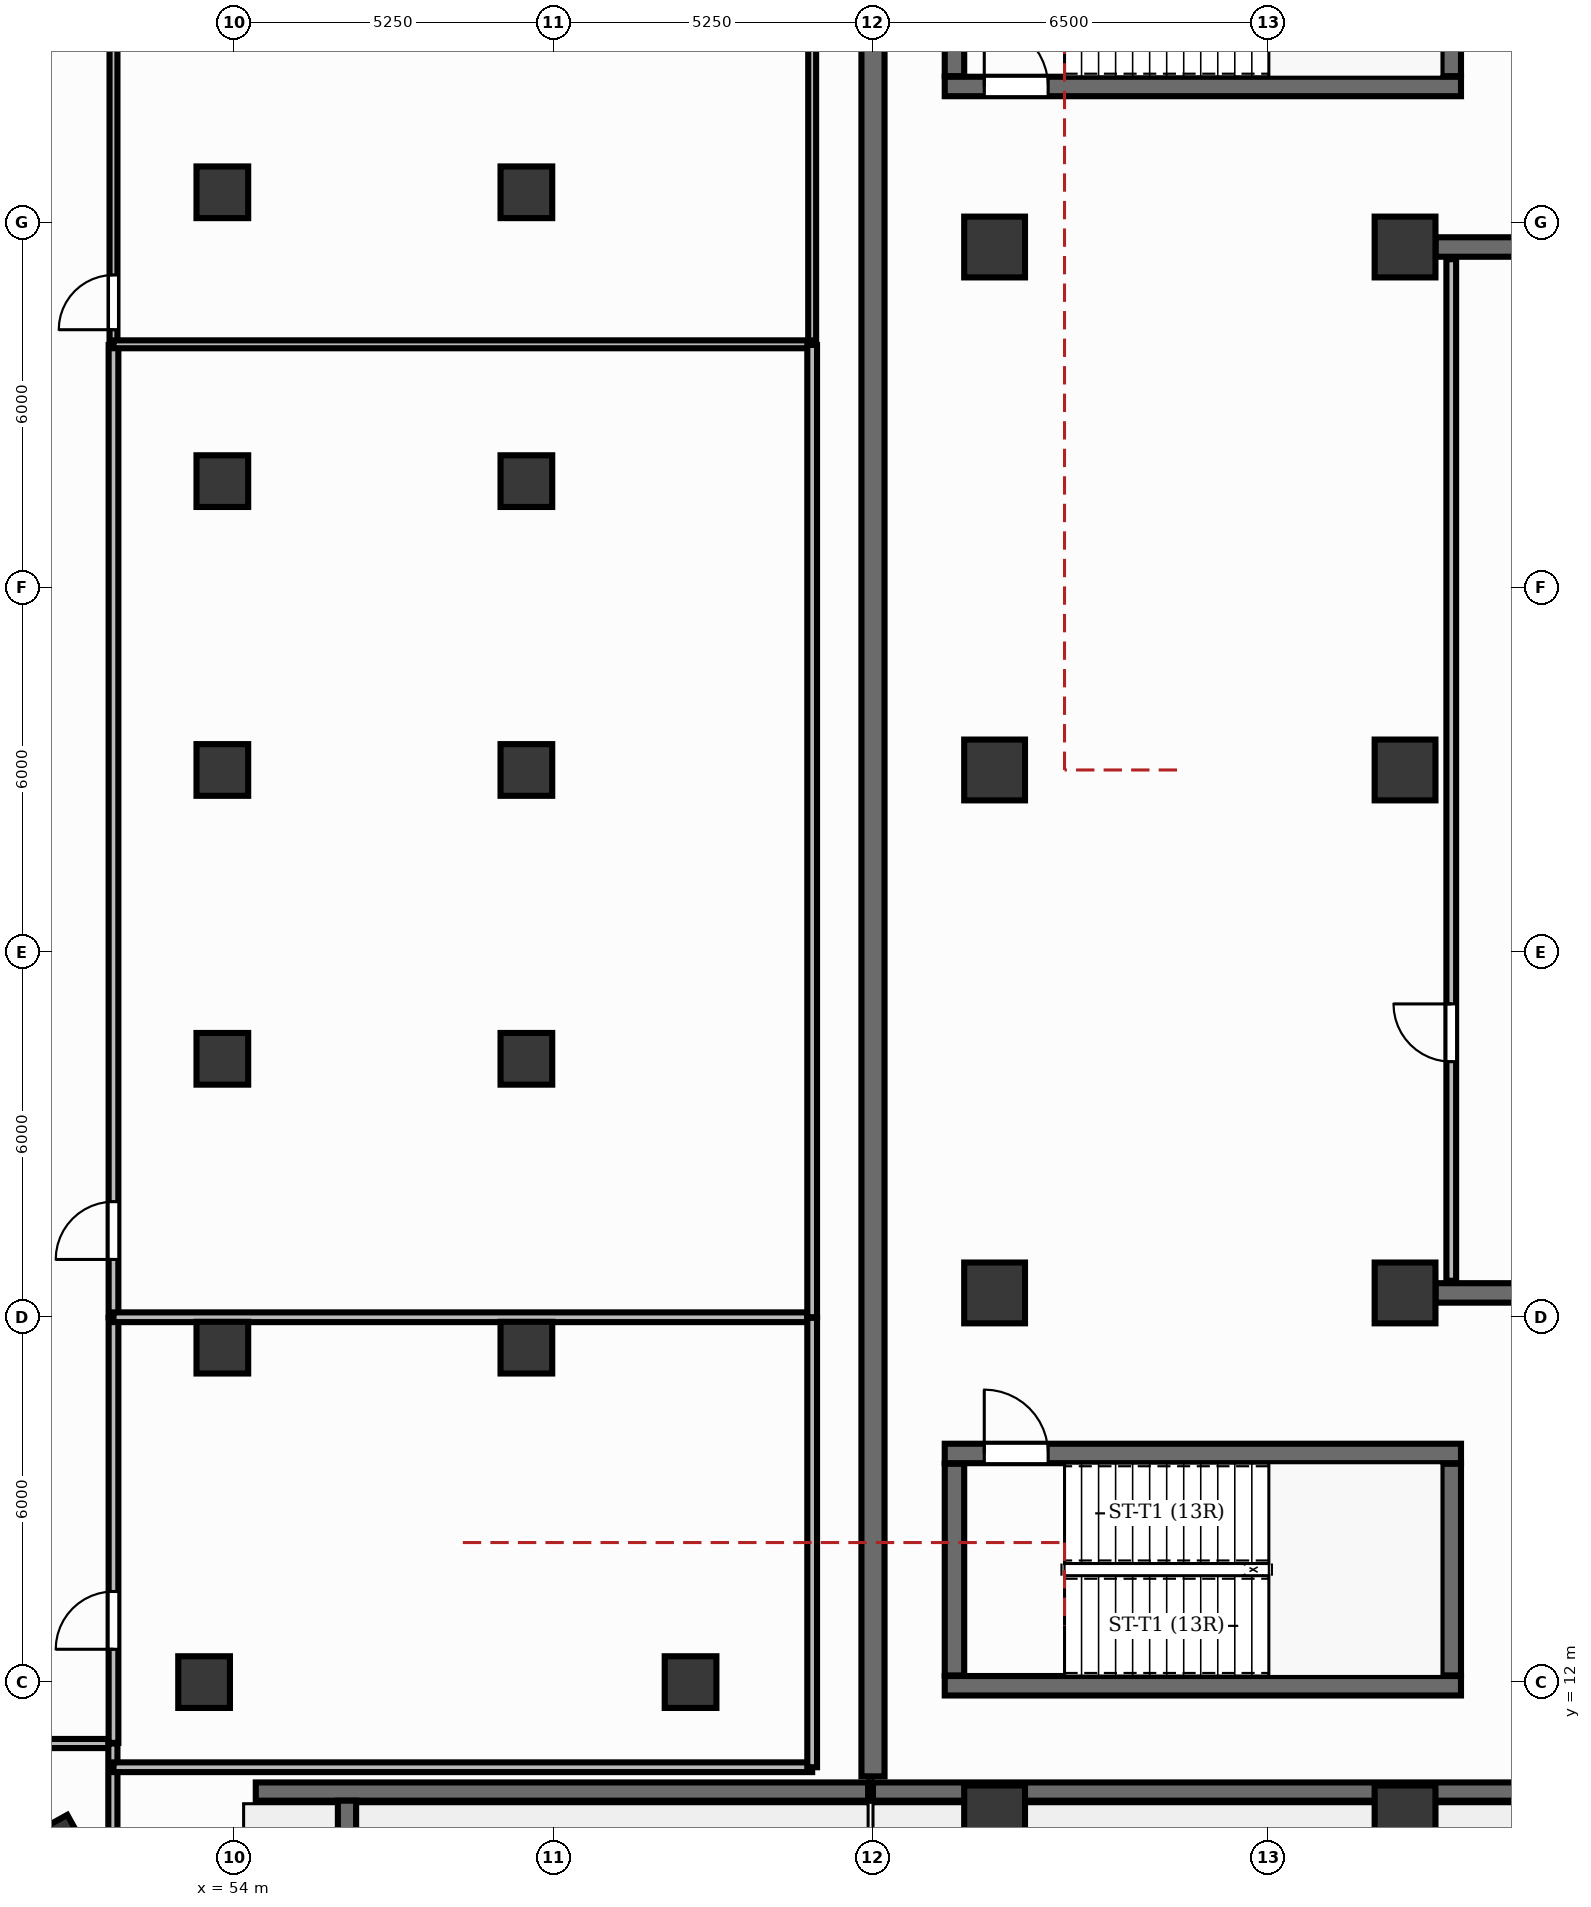
"""IFC4 building model, lengths in metres.
Left out: names, types, materials, properties, quantities, classifications, styles, units other than length and angle.
Written with IfcOpenShell. Run it as: python <this file> out.ifc"""

import sys

from ifc_helpers import new_model, si_unit, direction, frame, frame_2d, origin, origin_2d, place, context, subcontext, project, spatial, rectangle, extrude, element, fill, save


model = new_model("IFC4")
c1 = context("Model", 3, precision=1e-05, world=origin(), true_north=direction((0.0, 1.0)))
c2 = subcontext(c1, "Body", "Model", "MODEL_VIEW")
j1 = project(units=[si_unit("LENGTHUNIT", "METRE"), si_unit("PLANEANGLEUNIT", "RADIAN")], contexts=[c1])
p1 = place(None, origin())
s1 = spatial("IfcSite", under=j1, at=p1, CompositionType="ELEMENT")
p2 = place(p1, origin())
s2 = spatial("IfcBuilding", under=s1, at=p2, CompositionType="ELEMENT")
p3 = place(p2, frame((0.0, 0.0, -4.5)))
s3 = spatial("IfcBuildingStorey", under=s2, at=p3, CompositionType="ELEMENT", Elevation=-4.5)
p4 = place(p3, frame((54.35, 10.2, 0.0), z_axis=(0.0, 0.0, 1.0), x_axis=(1.0, 0.0, 0.0)))
e1 = element("IfcWall", 1, at=p4, inside=s3, PredefinedType="SHEAR", context=c2, shape_type="SweptSolid", body=[
    extrude(rectangle(XDim=10.07, YDim=0.3, at=frame_2d((5.035, 0.0))), origin(), (0.0, 0.0, 1.0), 4.5),
])
p5 = place(p3, frame((64.5, 10.2, 0.0), z_axis=(0.0, 0.0, 1.0), x_axis=(1.0, 0.0, 0.0)))
e2 = element("IfcWall", 2, at=p5, inside=s3, PredefinedType="SHEAR", context=c2, shape_type="SweptSolid", body=[
    extrude(rectangle(XDim=23.55, YDim=0.3, at=frame_2d((11.775, 0.0))), origin(), (0.0, 0.0, 1.0), 4.5),
])
p6 = place(p3, frame((55.85, 3.4, 0.0), z_axis=(0.0, 0.0, 1.0), x_axis=(0.0, 1.0, 0.0)))
e3 = element("IfcWall", 3, at=p6, inside=s3, PredefinedType="SHEAR", context=c2, shape_type="SweptSolid", body=[
    extrude(rectangle(XDim=6.65, YDim=0.3, at=frame_2d((3.325, 0.0))), origin(), (0.0, 0.0, 1.0), 4.5),
])
for number, where, z_axis, x_axis in (
    (4, (53.5, 12.0, 0.0), (0.0, 0.0, 1.0), (1.0, 0.0, 0.0)),
    (5, (61.5, 12.0, 0.0), (0.0, 0.0, 1.0), (1.0, 0.0, 0.0)),
):
    element("IfcColumn", number, at=place(p3, frame(where, z_axis=z_axis, x_axis=x_axis)), inside=s3, PredefinedType="COLUMN", context=c2, shape_type="SweptSolid", body=[
        extrude(rectangle(XDim=0.85, YDim=0.85, at=origin_2d()), origin(), (0.0, 0.0, 1.0), 4.18),
    ])
p7 = place(p3, frame((50.977, 8.865, 0.0), z_axis=(0.0, 0.0, 1.0), x_axis=(0.874535078577, 0.484962262797, 0.0)))
e6 = element("IfcColumn", 6, at=p7, inside=s3, PredefinedType="COLUMN", context=c2, shape_type="SweptSolid", body=[
    extrude(rectangle(XDim=1.4, YDim=1.4, at=origin_2d()), origin(), (0.0, 0.0, 1.0), 4.18),
])
for number, where, z_axis, x_axis in (
    (7, (66.5, 9.8, 0.0), (0.0, 0.0, 1.0), (1.0, 0.0, 0.0)),
    (8, (66.5, 18.4, 0.0), (0.0, 0.0, 1.0), (1.0, 0.0, 0.0)),
    (9, (66.5, 27.0, 0.0), (0.0, 0.0, 1.0), (1.0, 0.0, 0.0)),
    (10, (66.5, 35.6, 0.0), (0.0, 0.0, 1.0), (1.0, 0.0, 0.0)),
    (11, (73.25, 9.8, 0.0), (0.0, 0.0, 1.0), (1.0, 0.0, 0.0)),
    (12, (73.25, 18.4, 0.0), (0.0, 0.0, 1.0), (1.0, 0.0, 0.0)),
    (13, (73.25, 27.0, 0.0), (0.0, 0.0, 1.0), (1.0, 0.0, 0.0)),
    (14, (73.25, 35.6, 0.0), (0.0, 0.0, 1.0), (1.0, 0.0, 0.0)),
):
    element("IfcColumn", number, at=place(p3, frame(where, z_axis=z_axis, x_axis=x_axis)), inside=s3, PredefinedType="COLUMN", context=c2, shape_type="SweptSolid", body=[
        extrude(rectangle(XDim=1.0, YDim=1.0, at=origin_2d()), origin(), (0.0, 0.0, 1.0), 4.18),
    ])
p8 = place(p3, frame((64.5, 10.45, 0.0), z_axis=(0.0, 0.0, 1.0), x_axis=(0.0, 1.0, 0.0)))
e15 = element("IfcWall", 15, at=p8, inside=s3, PredefinedType="SHEAR", context=c2, shape_type="SweptSolid", body=[
    extrude(rectangle(XDim=36.3, YDim=0.38, at=frame_2d((18.15, 0.0))), origin(), (0.0, 0.0, 1.0), 4.18),
])
for number, where, z_axis, x_axis in (
    (16, (73.75, 18.4, 0.0), (0.0, 0.0, 1.0), (1.0, 0.0, 0.0)),
    (17, (73.75, 35.6, 0.0), (0.0, 0.0, 1.0), (1.0, 0.0, 0.0)),
):
    element("IfcWall", number, at=place(p3, frame(where, z_axis=z_axis, x_axis=x_axis)), inside=s3, PredefinedType="SHEAR", context=c2, shape_type="SweptSolid", body=[
        extrude(rectangle(XDim=12.5, YDim=0.32, at=frame_2d((6.25, 0.0))), origin(), (0.0, 0.0, 1.0), 4.18),
    ])
p9 = place(p3, frame((65.68, 11.94, 0.0), z_axis=(0.0, 0.0, 1.0), x_axis=(1.0, 0.0, 0.0)))
e18 = element("IfcWall", 18, at=p9, inside=s3, PredefinedType="SHEAR", context=c2, shape_type="SweptSolid", body=[
    extrude(rectangle(XDim=8.49, YDim=0.32, at=frame_2d((4.245, 0.0))), origin(), (0.0, 0.0, 1.0), 4.18),
])
p10 = place(p3, frame((65.68, 15.76, 0.0), z_axis=(0.0, 0.0, 1.0), x_axis=(1.0, 0.0, 0.0)))
e19 = element("IfcWall", 19, at=p10, inside=s3, PredefinedType="SHEAR", context=c2, shape_type="SweptSolid", body=[
    extrude(rectangle(XDim=8.49, YDim=0.32, at=frame_2d((4.245, 0.0))), origin(), (0.0, 0.0, 1.0), 4.18),
])
p11 = place(p10, frame((0.65, 0.0, 0.0)))
e20 = element("IfcOpeningElement", 20, at=p11, cuts=e19, PredefinedType="OPENING", context=c2, shape_type="SweptSolid", body=[
    extrude(rectangle(XDim=1.05, YDim=2.15, at=frame_2d((0.525, 1.075))), frame((0.0, 0.175, 0.0), z_axis=(0.0, -1.0, 0.0), x_axis=(1.0, 0.0, 0.0)), (0.0, 0.0, 1.0), 0.35),
])
for number, where, z_axis, x_axis in (
    (21, (74.01, 12.11, 0.0), (0.0, 0.0, 1.0), (0.0, 1.0, 0.0)),
    (22, (65.84, 12.11, 0.0), (0.0, 0.0, 1.0), (0.0, 1.0, 0.0)),
):
    element("IfcWall", number, at=place(p3, frame(where, z_axis=z_axis, x_axis=x_axis)), inside=s3, PredefinedType="SHEAR", context=c2, shape_type="SweptSolid", body=[
        extrude(rectangle(XDim=3.48, YDim=0.32, at=frame_2d((1.74, 0.0))), origin(), (0.0, 0.0, 1.0), 4.18),
    ])
p12 = place(p3, frame((65.68, 38.24, 0.0), z_axis=(0.0, 0.0, 1.0), x_axis=(1.0, 0.0, 0.0)))
e23 = element("IfcWall", 23, at=p12, inside=s3, PredefinedType="SHEAR", context=c2, shape_type="SweptSolid", body=[
    extrude(rectangle(XDim=8.49, YDim=0.32, at=frame_2d((4.245, 0.0))), origin(), (0.0, 0.0, 1.0), 4.18),
])
p13 = place(p12, frame((0.65, 0.0, 0.0)))
e24 = element("IfcOpeningElement", 24, at=p13, cuts=e23, PredefinedType="OPENING", context=c2, shape_type="SweptSolid", body=[
    extrude(rectangle(XDim=1.05, YDim=2.15, at=frame_2d((0.525, 1.075))), frame((0.0, 0.175, 0.0), z_axis=(0.0, -1.0, 0.0), x_axis=(1.0, 0.0, 0.0)), (0.0, 0.0, 1.0), 0.35),
])
for number, where, z_axis, x_axis in (
    (25, (74.01, 38.41, 0.0), (0.0, 0.0, 1.0), (0.0, 1.0, 0.0)),
    (26, (65.84, 38.41, 0.0), (0.0, 0.0, 1.0), (0.0, 1.0, 0.0)),
):
    element("IfcWall", number, at=place(p3, frame(where, z_axis=z_axis, x_axis=x_axis)), inside=s3, PredefinedType="SHEAR", context=c2, shape_type="SweptSolid", body=[
        extrude(rectangle(XDim=3.48, YDim=0.32, at=frame_2d((1.74, 0.0))), origin(), (0.0, 0.0, 1.0), 4.18),
    ])
for number, where, z_axis, x_axis in (
    (27, (58.8, 17.5, 0.0), (0.0, 0.0, 1.0), (1.0, 0.0, 0.0)),
    (28, (53.8, 17.5, 0.0), (0.0, 0.0, 1.0), (1.0, 0.0, 0.0)),
    (29, (58.8, 22.25, 0.0), (0.0, 0.0, 1.0), (1.0, 0.0, 0.0)),
    (30, (53.8, 22.25, 0.0), (0.0, 0.0, 1.0), (1.0, 0.0, 0.0)),
    (31, (58.8, 27.0, 0.0), (0.0, 0.0, 1.0), (1.0, 0.0, 0.0)),
    (32, (53.8, 27.0, 0.0), (0.0, 0.0, 1.0), (1.0, 0.0, 0.0)),
    (33, (58.8, 31.75, 0.0), (0.0, 0.0, 1.0), (1.0, 0.0, 0.0)),
    (34, (53.8, 31.75, 0.0), (0.0, 0.0, 1.0), (1.0, 0.0, 0.0)),
    (35, (58.8, 36.5, 0.0), (0.0, 0.0, 1.0), (1.0, 0.0, 0.0)),
    (36, (53.8, 36.5, 0.0), (0.0, 0.0, 1.0), (1.0, 0.0, 0.0)),
):
    element("IfcColumn", number, at=place(p3, frame(where, z_axis=z_axis, x_axis=x_axis)), inside=s3, PredefinedType="COLUMN", context=c2, shape_type="SweptSolid", body=[
        extrude(rectangle(XDim=0.85, YDim=0.85, at=origin_2d()), origin(), (0.0, 0.0, 1.0), 4.18),
    ])
p14 = place(p3, frame((8.21, 10.99, 0.0), z_axis=(0.0, 0.0, 1.0), x_axis=(1.0, 0.0, 0.0)))
e37 = element("IfcWall", 37, at=p14, inside=s3, PredefinedType="PARTITIONING", context=c2, shape_type="SweptSolid", body=[
    extrude(rectangle(XDim=43.79, YDim=0.15, at=frame_2d((21.895, 0.0))), origin(), (0.0, 0.0, 1.0), 3.04),
])
p15 = place(p14, frame((6.435, 0.0, 0.0)))
e38 = element("IfcOpeningElement", 38, at=p15, cuts=e37, PredefinedType="OPENING", context=c2, shape_type="SweptSolid", body=[
    extrude(rectangle(XDim=0.95, YDim=2.15, at=frame_2d((0.475, 1.075))), frame((0.0, 0.09, 0.0), z_axis=(0.0, -1.0, 0.0), x_axis=(1.0, 0.0, 0.0)), (0.0, 0.0, 1.0), 0.18),
])
p16 = place(p3, frame((52.01, 34.0, 0.0), z_axis=(0.0, 0.0, 1.0), x_axis=(0.0, 1.0, 0.0)))
e39 = element("IfcWall", 39, at=p16, inside=s3, PredefinedType="PARTITIONING", context=c2, shape_type="SweptSolid", body=[
    extrude(rectangle(XDim=8.0, YDim=0.13, at=frame_2d((4.0, 0.0))), origin(), (0.0, 0.0, 1.0), 3.04),
])
p17 = place(p16, frame((0.24, 0.0, 0.0)))
e40 = element("IfcOpeningElement", 40, at=p17, cuts=e39, PredefinedType="OPENING", context=c2, shape_type="SweptSolid", body=[
    extrude(rectangle(XDim=0.9, YDim=2.15, at=frame_2d((0.45, 1.075))), frame((0.0, 0.08, 0.0), z_axis=(0.0, -1.0, 0.0), x_axis=(1.0, 0.0, 0.0)), (0.0, 0.0, 1.0), 0.16),
])
p18 = place(p3, frame((52.01, 18.0, 0.0), z_axis=(0.0, 0.0, 1.0), x_axis=(0.0, 1.0, 0.0)))
e41 = element("IfcWall", 41, at=p18, inside=s3, PredefinedType="PARTITIONING", context=c2, shape_type="SweptSolid", body=[
    extrude(rectangle(XDim=15.99, YDim=0.16, at=frame_2d((7.995, 0.0))), origin(), (0.0, 0.0, 1.0), 3.04),
])
p19 = place(p18, frame((0.95, 0.0, 0.0)))
e42 = element("IfcOpeningElement", 42, at=p19, cuts=e41, PredefinedType="OPENING", context=c2, shape_type="SweptSolid", body=[
    extrude(rectangle(XDim=0.95, YDim=2.15, at=frame_2d((0.475, 1.075))), frame((0.0, 0.095, 0.0), z_axis=(0.0, -1.0, 0.0), x_axis=(1.0, 0.0, 0.0)), (0.0, 0.0, 1.0), 0.19),
])
p20 = place(p3, frame((52.01, 11.0, 0.0), z_axis=(0.0, 0.0, 1.0), x_axis=(0.0, 1.0, 0.0)))
e43 = element("IfcWall", 43, at=p20, inside=s3, PredefinedType="PARTITIONING", context=c2, shape_type="SweptSolid", body=[
    extrude(rectangle(XDim=6.99, YDim=0.16, at=frame_2d((3.495, 0.0))), origin(), (0.0, 0.0, 1.0), 3.04),
])
p21 = place(p20, frame((1.54, 0.0, 0.0)))
e44 = element("IfcOpeningElement", 44, at=p21, cuts=e43, PredefinedType="OPENING", context=c2, shape_type="SweptSolid", body=[
    extrude(rectangle(XDim=0.95, YDim=2.15, at=frame_2d((0.475, 1.075))), frame((0.0, 0.095, 0.0), z_axis=(0.0, -1.0, 0.0), x_axis=(1.0, 0.0, 0.0)), (0.0, 0.0, 1.0), 0.19),
])
p22 = place(p3, frame((74.01, 18.6, 0.0), z_axis=(0.0, 0.0, 1.0), x_axis=(0.0, 1.0, 0.0)))
e45 = element("IfcWall", 45, at=p22, inside=s3, PredefinedType="PARTITIONING", context=c2, shape_type="SweptSolid", body=[
    extrude(rectangle(XDim=16.8, YDim=0.16, at=frame_2d((8.4, 0.0))), origin(), (0.0, 0.0, 1.0), 3.04),
])
p23 = place(p22, frame((3.603, 0.0, 0.0)))
e46 = element("IfcOpeningElement", 46, at=p23, cuts=e45, PredefinedType="OPENING", context=c2, shape_type="SweptSolid", body=[
    extrude(rectangle(XDim=0.95, YDim=2.15, at=frame_2d((0.475, 1.075))), frame((0.0, 0.095, 0.0), z_axis=(0.0, -1.0, 0.0), x_axis=(1.0, 0.0, 0.0)), (0.0, 0.0, 1.0), 0.19),
])
p24 = place(p3, frame((52.0, 10.99, 0.0), z_axis=(0.0, 0.0, 1.0), x_axis=(0.0, -1.0, 0.0)))
e47 = element("IfcWall", 47, at=p24, inside=s3, PredefinedType="PARTITIONING", context=c2, shape_type="SweptSolid", body=[
    extrude(rectangle(XDim=6.99, YDim=0.15, at=frame_2d((3.495, 0.0))), origin(), (0.0, 0.0, 1.0), 3.04),
])
p25 = place(p3, frame((63.5, 50.0, 0.0), z_axis=(0.0, 0.0, 1.0), x_axis=(0.0, -1.0, 0.0)))
e48 = element("IfcWall", 48, at=p25, inside=s3, PredefinedType="PARTITIONING", context=c2, shape_type="SweptSolid", body=[
    extrude(rectangle(XDim=16.0, YDim=0.13, at=frame_2d((8.0, 0.0))), origin(), (0.0, 0.0, 1.0), 3.04),
])
p26 = place(p3, frame((63.5, 34.0, 0.0), z_axis=(0.0, 0.0, 1.0), x_axis=(-1.0, 0.0, 0.0)))
e49 = element("IfcWall", 49, at=p26, inside=s3, PredefinedType="PARTITIONING", context=c2, shape_type="SweptSolid", body=[
    extrude(rectangle(XDim=11.49, YDim=0.13, at=frame_2d((5.745, 0.0))), origin(), (0.0, 0.0, 1.0), 3.04),
])
p27 = place(p3, frame((63.5, 18.0, 0.0), z_axis=(0.0, 0.0, 1.0), x_axis=(-1.0, 0.0, 0.0)))
e50 = element("IfcWall", 50, at=p27, inside=s3, PredefinedType="PARTITIONING", context=c2, shape_type="SweptSolid", body=[
    extrude(rectangle(XDim=11.49, YDim=0.16, at=frame_2d((5.745, 0.0))), origin(), (0.0, 0.0, 1.0), 3.04),
])
p28 = place(p3, frame((63.5, 33.99, 0.0), z_axis=(0.0, 0.0, 1.0), x_axis=(0.0, -1.0, 0.0)))
e51 = element("IfcWall", 51, at=p28, inside=s3, PredefinedType="PARTITIONING", context=c2, shape_type="SweptSolid", body=[
    extrude(rectangle(XDim=15.99, YDim=0.16, at=frame_2d((7.995, 0.0))), origin(), (0.0, 0.0, 1.0), 3.04),
])
p29 = place(p3, frame((63.5, 10.6, 0.0), z_axis=(0.0, 0.0, 1.0), x_axis=(-1.0, 0.0, 0.0)))
e52 = element("IfcWall", 52, at=p29, inside=s3, PredefinedType="PARTITIONING", context=c2, shape_type="SweptSolid", body=[
    extrude(rectangle(XDim=11.49, YDim=0.16, at=frame_2d((5.745, 0.0))), origin(), (0.0, 0.0, 1.0), 3.04),
])
p30 = place(p3, frame((63.5, 17.99, 0.0), z_axis=(0.0, 0.0, 1.0), x_axis=(0.0, -1.0, 0.0)))
e53 = element("IfcWall", 53, at=p30, inside=s3, PredefinedType="PARTITIONING", context=c2, shape_type="SweptSolid", body=[
    extrude(rectangle(XDim=7.39, YDim=0.16, at=frame_2d((3.695, 0.0))), origin(), (0.0, 0.0, 1.0), 3.04),
])
p31 = place(p11, origin())
e54 = element("IfcDoor", 54, at=p31, inside=s3, OperationType="SINGLE_SWING_LEFT", PredefinedType="DOOR", context=c2, shape_type="SweptSolid", body=[
    extrude(rectangle(XDim=1.05, YDim=2.15, at=frame_2d((0.525, 1.075))), frame((0.0, 0.025, 0.0), z_axis=(0.0, -1.0, 0.0), x_axis=(1.0, 0.0, 0.0)), (0.0, 0.0, 1.0), 0.05),
])
fill(e20, e54)
p32 = place(p13, origin())
e55 = element("IfcDoor", 55, at=p32, inside=s3, OperationType="SINGLE_SWING_LEFT", PredefinedType="DOOR", context=c2, shape_type="SweptSolid", body=[
    extrude(rectangle(XDim=1.05, YDim=2.15, at=frame_2d((0.525, 1.075))), frame((0.0, 0.025, 0.0), z_axis=(0.0, -1.0, 0.0), x_axis=(1.0, 0.0, 0.0)), (0.0, 0.0, 1.0), 0.05),
])
fill(e24, e55)
p33 = place(p17, origin())
e56 = element("IfcDoor", 56, at=p33, inside=s3, OperationType="SINGLE_SWING_LEFT", PredefinedType="DOOR", context=c2, shape_type="SweptSolid", body=[
    extrude(rectangle(XDim=0.9, YDim=2.15, at=frame_2d((0.45, 1.075))), frame((0.0, 0.025, 0.0), z_axis=(0.0, -1.0, 0.0), x_axis=(1.0, 0.0, 0.0)), (0.0, 0.0, 1.0), 0.05),
])
fill(e40, e56)
p34 = place(p19, origin())
e57 = element("IfcDoor", 57, at=p34, inside=s3, OperationType="SINGLE_SWING_LEFT", PredefinedType="DOOR", context=c2, shape_type="SweptSolid", body=[
    extrude(rectangle(XDim=0.95, YDim=2.15, at=frame_2d((0.475, 1.075))), frame((0.0, 0.025, 0.0), z_axis=(0.0, -1.0, 0.0), x_axis=(1.0, 0.0, 0.0)), (0.0, 0.0, 1.0), 0.05),
])
fill(e42, e57)
p35 = place(p21, origin())
e58 = element("IfcDoor", 58, at=p35, inside=s3, OperationType="SINGLE_SWING_LEFT", PredefinedType="DOOR", context=c2, shape_type="SweptSolid", body=[
    extrude(rectangle(XDim=0.95, YDim=2.15, at=frame_2d((0.475, 1.075))), frame((0.0, 0.025, 0.0), z_axis=(0.0, -1.0, 0.0), x_axis=(1.0, 0.0, 0.0)), (0.0, 0.0, 1.0), 0.05),
])
fill(e44, e58)
p36 = place(p23, origin())
e59 = element("IfcDoor", 59, at=p36, inside=s3, OperationType="SINGLE_SWING_RIGHT", PredefinedType="DOOR", context=c2, shape_type="SweptSolid", body=[
    extrude(rectangle(XDim=0.95, YDim=2.15, at=frame_2d((0.475, 1.075))), frame((0.0, 0.025, 0.0), z_axis=(0.0, -1.0, 0.0), x_axis=(1.0, 0.0, 0.0)), (0.0, 0.0, 1.0), 0.05),
])
fill(e46, e59)
save(model, sys.argv[1])
